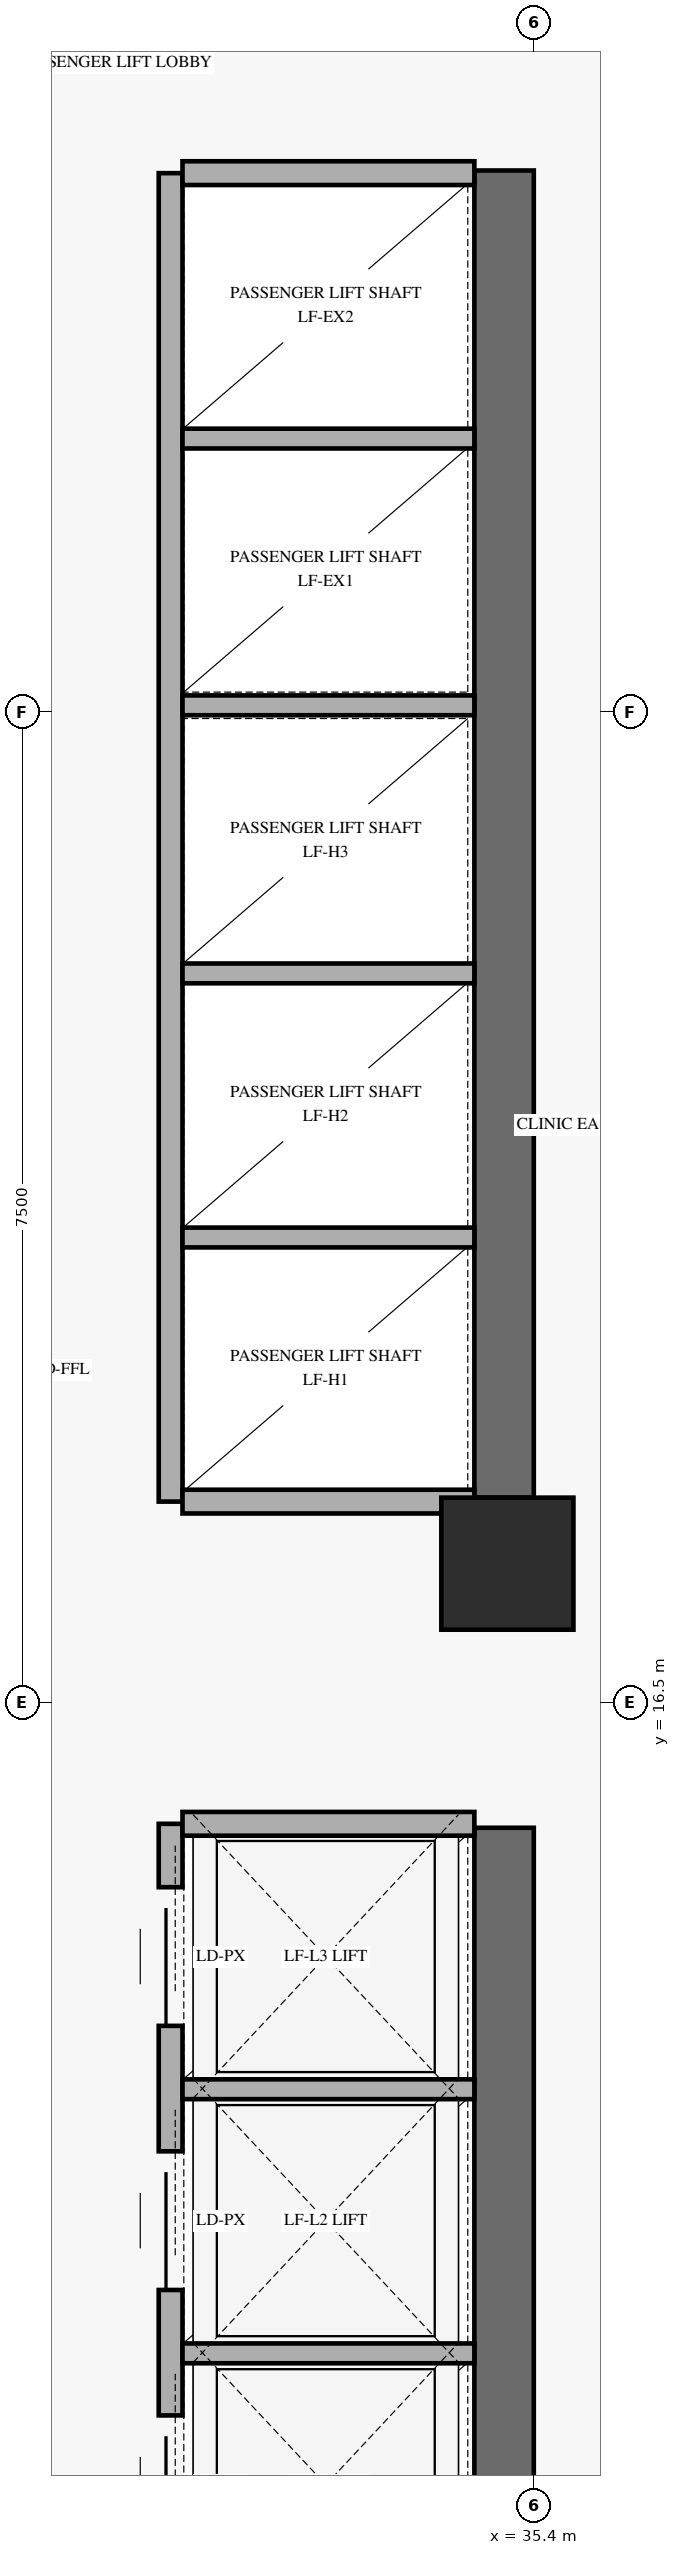
"""IFC4 building model, lengths in metres.
Left out: names, types, materials, properties, quantities, classifications, styles, units other than length and angle.
Written with IfcOpenShell. Run it as: python <this file> out.ifc"""

import sys

from ifc_helpers import new_model, si_unit, direction, frame, frame_2d, origin, origin_2d, place, context, subcontext, project, spatial, rectangle, extrude, element, fill, save


model = new_model("IFC4")
c1 = context("Model", 3, precision=1e-05, world=origin(), true_north=direction((0.0, 1.0)))
c2 = subcontext(c1, "Body", "Model", "MODEL_VIEW")
j1 = project(units=[si_unit("LENGTHUNIT", "METRE"), si_unit("PLANEANGLEUNIT", "RADIAN")], contexts=[c1])
p1 = place(None, origin())
s1 = spatial("IfcSite", under=j1, at=p1, CompositionType="ELEMENT")
p2 = place(p1, origin())
s2 = spatial("IfcBuilding", under=s1, at=p2, CompositionType="ELEMENT")
p3 = place(p2, frame((0.0, 0.0, 9.6)))
s3 = spatial("IfcBuildingStorey", under=s2, at=p3, CompositionType="ELEMENT", Elevation=9.6)
p4 = place(p3, frame((35.175, 9.75, 0.0), z_axis=(0.0, 0.0, 1.0), x_axis=(0.0, 1.0, 0.0)))
e1 = element("IfcWall", 1, at=p4, inside=s3, PredefinedType="SHEAR", context=c2, shape_type="SweptSolid", body=[
    extrude(rectangle(XDim=5.8, YDim=0.45, at=frame_2d((2.9, 0.0))), origin(), (0.0, 0.0, 1.0), 3.75),
])
p5 = place(p3, frame((35.175, 18.05, 0.0), z_axis=(0.0, 0.0, 1.0), x_axis=(0.0, 1.0, 0.0)))
e2 = element("IfcWall", 2, at=p5, inside=s3, PredefinedType="SHEAR", context=c2, shape_type="SweptSolid", body=[
    extrude(rectangle(XDim=10.05, YDim=0.45, at=frame_2d((5.025, 0.0))), origin(), (0.0, 0.0, 1.0), 3.75),
])
p6 = place(p3, frame((35.2, 17.55, 0.0), z_axis=(0.0, 0.0, 1.0), x_axis=(1.0, 0.0, 0.0)))
e3 = element("IfcColumn", 3, at=p6, inside=s3, PredefinedType="COLUMN", context=c2, shape_type="SweptSolid", body=[
    extrude(rectangle(XDim=1.0, YDim=1.0, at=origin_2d()), origin(), (0.0, 0.0, 1.0), 4.8),
])
p7 = place(p3, frame((32.65, 9.5, 0.0), z_axis=(0.0, 0.0, 1.0), x_axis=(0.0, 1.0, 0.0)))
e4 = element("IfcWall", 4, at=p7, inside=s3, PredefinedType="STANDARD", context=c2, shape_type="SweptSolid", body=[
    extrude(rectangle(XDim=6.08, YDim=0.18, at=frame_2d((3.04, 0.0))), origin(), (0.0, 0.0, 1.0), 4.52),
])
p8 = place(p7, frame((0.55, 0.0, 0.0)))
e5 = element("IfcOpeningElement", 5, at=p8, cuts=e4, PredefinedType="OPENING", context=c2, shape_type="SweptSolid", body=[
    extrude(rectangle(XDim=1.05, YDim=2.2, at=frame_2d((0.525, 1.1))), frame((0.0, 0.1, 0.0), z_axis=(0.0, -1.0, 0.0), x_axis=(1.0, 0.0, 0.0)), (0.0, 0.0, 1.0), 0.2),
])
p9 = place(p7, frame((2.55, 0.0, 0.0)))
e6 = element("IfcOpeningElement", 6, at=p9, cuts=e4, PredefinedType="OPENING", context=c2, shape_type="SweptSolid", body=[
    extrude(rectangle(XDim=1.05, YDim=2.2, at=frame_2d((0.525, 1.1))), frame((0.0, 0.1, 0.0), z_axis=(0.0, -1.0, 0.0), x_axis=(1.0, 0.0, 0.0)), (0.0, 0.0, 1.0), 0.2),
])
p10 = place(p7, frame((4.55, 0.0, 0.0)))
e7 = element("IfcOpeningElement", 7, at=p10, cuts=e4, PredefinedType="OPENING", context=c2, shape_type="SweptSolid", body=[
    extrude(rectangle(XDim=1.05, YDim=2.2, at=frame_2d((0.525, 1.1))), frame((0.0, 0.1, 0.0), z_axis=(0.0, -1.0, 0.0), x_axis=(1.0, 0.0, 0.0)), (0.0, 0.0, 1.0), 0.2),
])
p11 = place(p3, frame((32.74, 15.58, 0.0), z_axis=(0.0, 0.0, 1.0), x_axis=(1.0, 0.0, 0.0)))
e8 = element("IfcWall", 8, at=p11, inside=s3, PredefinedType="STANDARD", context=c2, shape_type="SweptSolid", body=[
    extrude(rectangle(XDim=2.21, YDim=0.18, at=frame_2d((1.105, 0.0))), origin(), (0.0, 0.0, 1.0), 4.52),
])
for number, where, z_axis, x_axis in (
    (9, (32.74, 11.57, 0.0), (0.0, 0.0, 1.0), (1.0, 0.0, 0.0)),
    (10, (32.74, 13.57, 0.0), (0.0, 0.0, 1.0), (1.0, 0.0, 0.0)),
):
    element("IfcWall", number, at=place(p3, frame(where, z_axis=z_axis, x_axis=x_axis)), inside=s3, PredefinedType="STANDARD", context=c2, shape_type="SweptSolid", body=[
        extrude(rectangle(XDim=2.21, YDim=0.15, at=frame_2d((1.105, 0.0))), origin(), (0.0, 0.0, 1.0), 4.52),
    ])
p12 = place(p3, frame((32.65, 18.02, 0.0), z_axis=(0.0, 0.0, 1.0), x_axis=(0.0, 1.0, 0.0)))
e11 = element("IfcWall", 11, at=p12, inside=s3, PredefinedType="STANDARD", context=c2, shape_type="SweptSolid", body=[
    extrude(rectangle(XDim=10.06, YDim=0.18, at=frame_2d((5.03, 0.0))), origin(), (0.0, 0.0, 1.0), 4.52),
])
for number, where, z_axis, x_axis in (
    (12, (32.74, 18.02, 0.0), (0.0, 0.0, 1.0), (1.0, 0.0, 0.0)),
    (13, (32.74, 28.08, 0.0), (0.0, 0.0, 1.0), (1.0, 0.0, 0.0)),
):
    element("IfcWall", number, at=place(p3, frame(where, z_axis=z_axis, x_axis=x_axis)), inside=s3, PredefinedType="STANDARD", context=c2, shape_type="SweptSolid", body=[
        extrude(rectangle(XDim=2.21, YDim=0.18, at=frame_2d((1.105, 0.0))), origin(), (0.0, 0.0, 1.0), 4.52),
    ])
for number, where, z_axis, x_axis in (
    (14, (32.74, 20.02, 0.0), (0.0, 0.0, 1.0), (1.0, 0.0, 0.0)),
    (15, (32.74, 22.02, 0.0), (0.0, 0.0, 1.0), (1.0, 0.0, 0.0)),
    (16, (32.74, 24.05, 0.0), (0.0, 0.0, 1.0), (1.0, 0.0, 0.0)),
    (17, (32.74, 26.07, 0.0), (0.0, 0.0, 1.0), (1.0, 0.0, 0.0)),
):
    element("IfcWall", number, at=place(p3, frame(where, z_axis=z_axis, x_axis=x_axis)), inside=s3, PredefinedType="STANDARD", context=c2, shape_type="SweptSolid", body=[
        extrude(rectangle(XDim=2.21, YDim=0.15, at=frame_2d((1.105, 0.0))), origin(), (0.0, 0.0, 1.0), 4.52),
    ])
p13 = place(p8, origin())
e18 = element("IfcDoor", 18, at=p13, inside=s3, OperationType="SLIDING_TO_LEFT", PredefinedType="DOOR", context=c2, shape_type="SweptSolid", body=[
    extrude(rectangle(XDim=1.05, YDim=2.2, at=frame_2d((0.525, 1.1))), frame((0.0, 0.025, 0.0), z_axis=(0.0, -1.0, 0.0), x_axis=(1.0, 0.0, 0.0)), (0.0, 0.0, 1.0), 0.05),
])
fill(e5, e18)
p14 = place(p9, origin())
e19 = element("IfcDoor", 19, at=p14, inside=s3, OperationType="SLIDING_TO_LEFT", PredefinedType="DOOR", context=c2, shape_type="SweptSolid", body=[
    extrude(rectangle(XDim=1.05, YDim=2.2, at=frame_2d((0.525, 1.1))), frame((0.0, 0.025, 0.0), z_axis=(0.0, -1.0, 0.0), x_axis=(1.0, 0.0, 0.0)), (0.0, 0.0, 1.0), 0.05),
])
fill(e6, e19)
p15 = place(p10, origin())
e20 = element("IfcDoor", 20, at=p15, inside=s3, OperationType="SLIDING_TO_LEFT", PredefinedType="DOOR", context=c2, shape_type="SweptSolid", body=[
    extrude(rectangle(XDim=1.05, YDim=2.2, at=frame_2d((0.525, 1.1))), frame((0.0, 0.025, 0.0), z_axis=(0.0, -1.0, 0.0), x_axis=(1.0, 0.0, 0.0)), (0.0, 0.0, 1.0), 0.05),
])
fill(e7, e20)
save(model, sys.argv[1])
